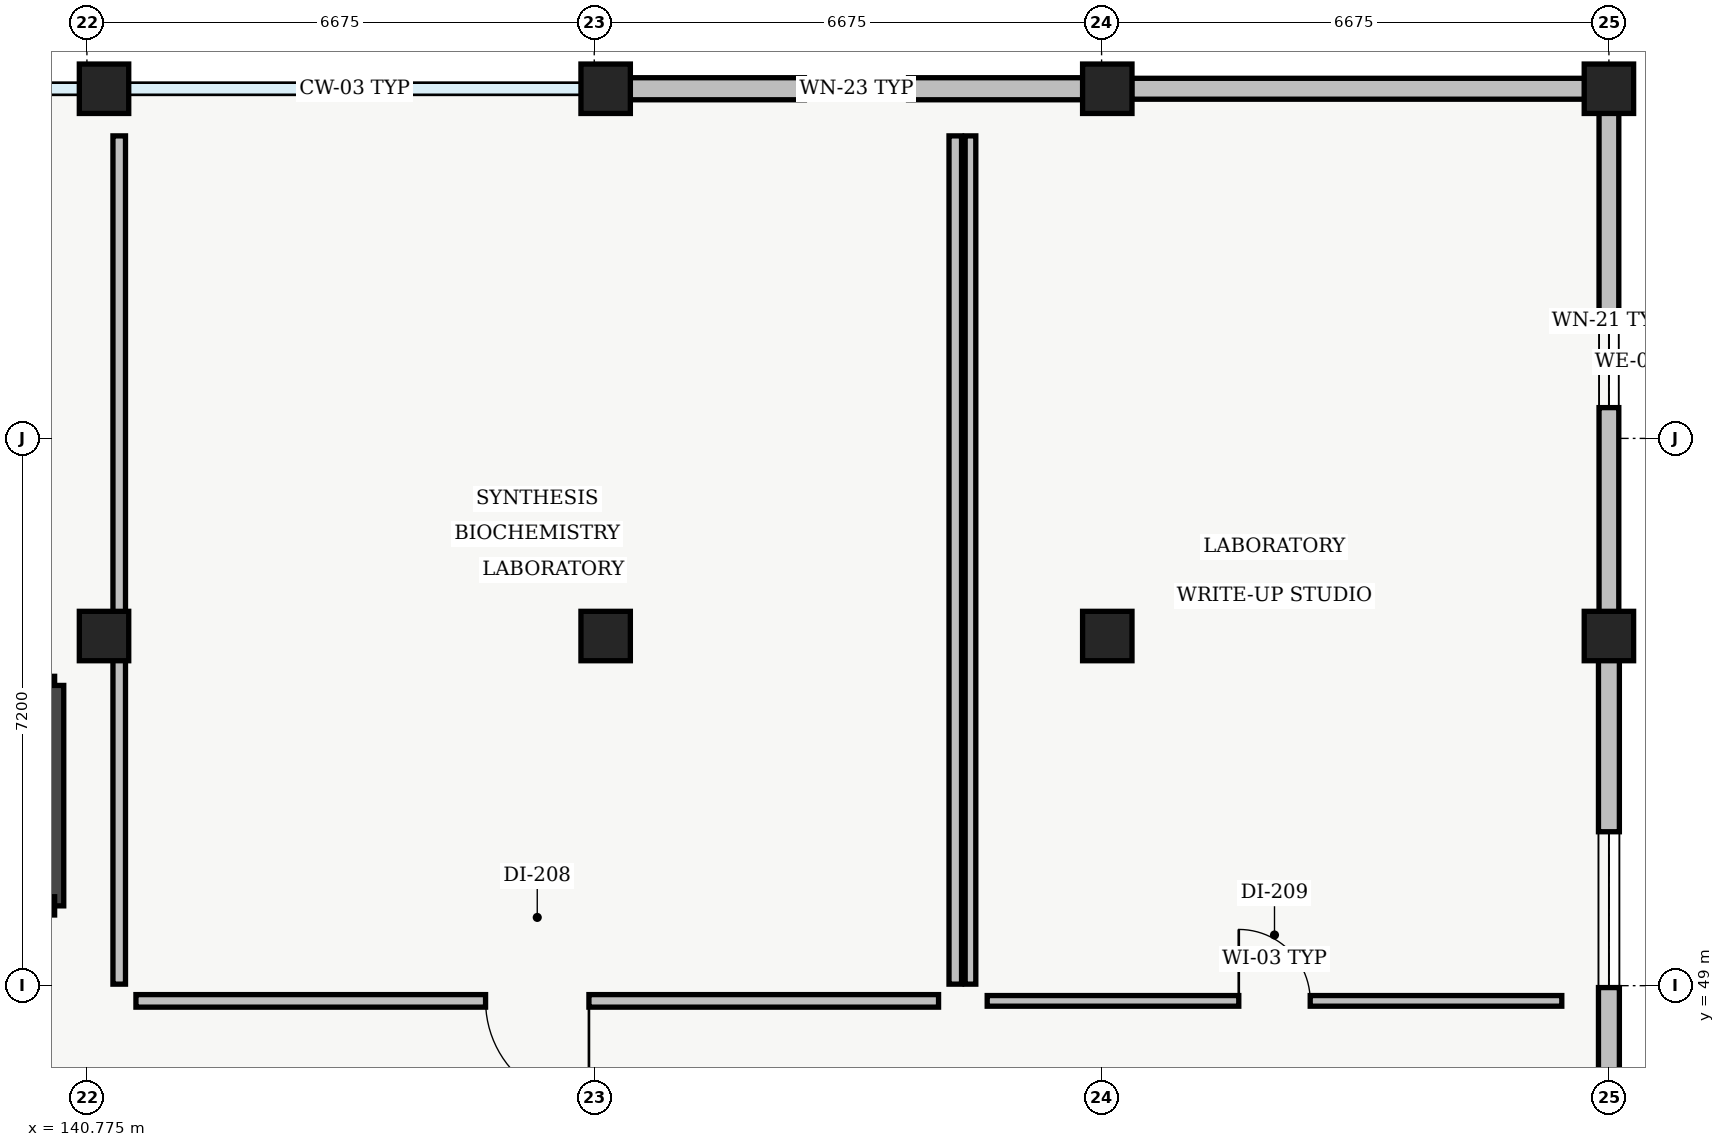
"""IFC4 building model, lengths in metres.
Left out: names, types, materials, properties, quantities, classifications, styles, units other than length and angle.
Written with IfcOpenShell. Run it as: python <this file> out.ifc"""

import sys

from ifc_helpers import new_model, si_unit, direction, frame, frame_2d, origin, origin_2d, place, context, subcontext, project, spatial, rectangle, extrude, element, fill, save


model = new_model("IFC4")
c1 = context("Model", 3, precision=1e-05, world=origin(), true_north=direction((0.0, 1.0)))
c2 = subcontext(c1, "Body", "Model", "MODEL_VIEW")
j1 = project(units=[si_unit("LENGTHUNIT", "METRE"), si_unit("PLANEANGLEUNIT", "RADIAN")], contexts=[c1])
p1 = place(None, origin())
s1 = spatial("IfcSite", under=j1, at=p1, CompositionType="ELEMENT")
p2 = place(p1, origin())
s2 = spatial("IfcBuilding", under=s1, at=p2, CompositionType="ELEMENT")
p3 = place(p2, frame((0.0, 0.0, 9.6)))
s3 = spatial("IfcBuildingStorey", under=s2, at=p3, CompositionType="ELEMENT", Elevation=9.6)
for number, where, z_axis, x_axis in (
    (1, (141.0, 53.6, 0.0), (0.0, 0.0, 1.0), (1.0, 0.0, 0.0)),
    (2, (141.0, 60.8, 0.0), (0.0, 0.0, 1.0), (1.0, 0.0, 0.0)),
    (3, (147.6, 53.6, 0.0), (0.0, 0.0, 1.0), (1.0, 0.0, 0.0)),
    (4, (147.6, 60.8, 0.0), (0.0, 0.0, 1.0), (1.0, 0.0, 0.0)),
    (5, (154.2, 53.6, 0.0), (0.0, 0.0, 1.0), (1.0, 0.0, 0.0)),
    (6, (154.2, 60.8, 0.0), (0.0, 0.0, 1.0), (1.0, 0.0, 0.0)),
    (7, (160.8, 53.6, 0.0), (0.0, 0.0, 1.0), (1.0, 0.0, 0.0)),
    (8, (160.8, 60.8, 0.0), (0.0, 0.0, 1.0), (1.0, 0.0, 0.0)),
):
    element("IfcColumn", number, at=place(p3, frame(where, z_axis=z_axis, x_axis=x_axis)), inside=s3, PredefinedType="COLUMN", context=c2, shape_type="SweptSolid", body=[
        extrude(rectangle(XDim=0.65, YDim=0.65, at=origin_2d()), origin(), (0.0, 0.0, 1.0), 4.3),
    ])
p4 = place(p3, frame((147.92, 60.8, 0.0), z_axis=(0.0, 0.0, 1.0), x_axis=(1.0, 0.0, 0.0)))
e9 = element("IfcWall", 9, at=p4, inside=s3, PredefinedType="STANDARD", context=c2, shape_type="SweptSolid", body=[
    extrude(rectangle(XDim=5.96, YDim=0.29, at=frame_2d((2.98, 0.0))), origin(), (0.0, 0.0, 1.0), 3.835),
])
p5 = place(p4, frame((2.295, 0.0, 0.95)))
e10 = element("IfcOpeningElement", 10, at=p5, cuts=e9, PredefinedType="OPENING", context=c2, shape_type="SweptSolid", body=[
    extrude(rectangle(XDim=1.37, YDim=1.42, at=frame_2d((0.685, 0.71))), frame((0.0, 0.145, 0.0), z_axis=(0.0, -1.0, 0.0), x_axis=(1.0, 0.0, 0.0)), (0.0, 0.0, 1.0), 0.29),
])
p6 = place(p3, frame((154.52, 60.8, 0.0), z_axis=(0.0, 0.0, 1.0), x_axis=(1.0, 0.0, 0.0)))
e11 = element("IfcWall", 11, at=p6, inside=s3, PredefinedType="STANDARD", context=c2, shape_type="SweptSolid", body=[
    extrude(rectangle(XDim=5.96, YDim=0.275, at=frame_2d((2.98, 0.0))), origin(), (0.0, 0.0, 1.0), 3.835),
])
p7 = place(p3, frame((160.8, 60.48, 0.0), z_axis=(0.0, 0.0, 1.0), x_axis=(0.0, -1.0, 0.0)))
e12 = element("IfcWall", 12, at=p7, inside=s3, PredefinedType="STANDARD", context=c2, shape_type="SweptSolid", body=[
    extrude(rectangle(XDim=6.56, YDim=0.26, at=frame_2d((3.28, 0.0))), origin(), (0.0, 0.0, 1.0), 3.835),
])
p8 = place(p7, frame((2.685, 0.0, 0.95)))
e13 = element("IfcOpeningElement", 13, at=p8, cuts=e12, PredefinedType="OPENING", context=c2, shape_type="SweptSolid", body=[
    extrude(rectangle(XDim=1.19, YDim=1.38, at=frame_2d((0.595, 0.69))), frame((0.0, 0.13, 0.0), z_axis=(0.0, -1.0, 0.0), x_axis=(1.0, 0.0, 0.0)), (0.0, 0.0, 1.0), 0.26),
])
p9 = place(p3, frame((160.8, 53.28, 0.0), z_axis=(0.0, 0.0, 1.0), x_axis=(0.0, -1.0, 0.0)))
e14 = element("IfcWall", 14, at=p9, inside=s3, PredefinedType="STANDARD", context=c2, shape_type="SweptSolid", body=[
    extrude(rectangle(XDim=6.56, YDim=0.275, at=frame_2d((3.28, 0.0))), origin(), (0.0, 0.0, 1.0), 3.835),
])
p10 = place(p9, frame((2.255, 0.0, 0.95)))
e15 = element("IfcOpeningElement", 15, at=p10, cuts=e14, PredefinedType="OPENING", context=c2, shape_type="SweptSolid", body=[
    extrude(rectangle(XDim=2.05, YDim=1.7, at=frame_2d((1.025, 0.85))), frame((0.0, 0.137, 0.0), z_axis=(0.0, -1.0, 0.0), x_axis=(1.0, 0.0, 0.0)), (0.0, 0.0, 1.0), 0.275),
])
p11 = place(p3, frame((138.05, 52.95, 0.0), z_axis=(0.0, 0.0, 1.0), x_axis=(1.0, 0.0, 0.0)))
e16 = element("IfcWall", 16, at=p11, inside=s3, PredefinedType="SHEAR", context=c2, shape_type="SweptSolid", body=[
    extrude(rectangle(XDim=2.3, YDim=0.24, at=frame_2d((1.15, 0.0))), origin(), (0.0, 0.0, 1.0), 4.28),
])
p12 = place(p3, frame((140.35, 52.95, 0.0), z_axis=(0.0, 0.0, 1.0), x_axis=(0.0, -1.0, 0.0)))
e17 = element("IfcWall", 17, at=p12, inside=s3, PredefinedType="SHEAR", context=c2, shape_type="SweptSolid", body=[
    extrude(rectangle(XDim=2.9, YDim=0.24, at=frame_2d((1.45, 0.0))), origin(), (0.0, 0.0, 1.0), 4.28),
])
p13 = place(p3, frame((140.35, 50.05, 0.0), z_axis=(0.0, 0.0, 1.0), x_axis=(-1.0, 0.0, 0.0)))
e18 = element("IfcWall", 18, at=p13, inside=s3, PredefinedType="SHEAR", context=c2, shape_type="SweptSolid", body=[
    extrude(rectangle(XDim=2.3, YDim=0.24, at=frame_2d((1.15, 0.0))), origin(), (0.0, 0.0, 1.0), 4.28),
])
p14 = place(p13, frame((0.425, 0.0, 0.0)))
e19 = element("IfcOpeningElement", 19, at=p14, cuts=e18, PredefinedType="OPENING", context=c2, shape_type="SweptSolid", body=[
    extrude(rectangle(XDim=1.45, YDim=2.3, at=frame_2d((0.725, 1.15))), frame((0.0, 0.12, 0.0), z_axis=(0.0, -1.0, 0.0), x_axis=(1.0, 0.0, 0.0)), (0.0, 0.0, 1.0), 0.24),
])
p15 = place(p3, frame((141.42, 48.8, 0.0), z_axis=(0.0, 0.0, 1.0), x_axis=(1.0, 0.0, 0.0)))
e20 = element("IfcWall", 20, at=p15, inside=s3, PredefinedType="PARTITIONING", context=c2, shape_type="SweptSolid", body=[
    extrude(rectangle(XDim=10.56, YDim=0.165, at=frame_2d((5.28, 0.0))), origin(), (0.0, 0.0, 1.0), 3.835),
])
p16 = place(p15, frame((4.6, 0.0, 0.0)))
e21 = element("IfcOpeningElement", 21, at=p16, cuts=e20, PredefinedType="OPENING", context=c2, shape_type="SweptSolid", body=[
    extrude(rectangle(XDim=1.36, YDim=2.14, at=frame_2d((0.68, 1.07))), frame((0.0, 0.083, 0.0), z_axis=(0.0, -1.0, 0.0), x_axis=(1.0, 0.0, 0.0)), (0.0, 0.0, 1.0), 0.165),
])
p17 = place(p3, frame((152.2, 49.02, 0.0), z_axis=(0.0, 0.0, 1.0), x_axis=(0.0, 1.0, 0.0)))
e22 = element("IfcWall", 22, at=p17, inside=s3, PredefinedType="PARTITIONING", context=c2, shape_type="SweptSolid", body=[
    extrude(rectangle(XDim=11.16, YDim=0.165, at=frame_2d((5.58, 0.0))), origin(), (0.0, 0.0, 1.0), 3.95),
])
p18 = place(p3, frame((141.2, 60.18, 0.0), z_axis=(0.0, 0.0, 1.0), x_axis=(0.0, -1.0, 0.0)))
e23 = element("IfcWall", 23, at=p18, inside=s3, PredefinedType="PARTITIONING", context=c2, shape_type="SweptSolid", body=[
    extrude(rectangle(XDim=11.16, YDim=0.165, at=frame_2d((5.58, 0.0))), origin(), (0.0, 0.0, 1.0), 3.635),
])
p19 = place(p3, frame((152.62, 48.8, 0.0), z_axis=(0.0, 0.0, 1.0), x_axis=(1.0, 0.0, 0.0)))
e24 = element("IfcWall", 24, at=p19, inside=s3, PredefinedType="PARTITIONING", context=c2, shape_type="SweptSolid", body=[
    extrude(rectangle(XDim=7.56, YDim=0.14, at=frame_2d((3.78, 0.0))), origin(), (0.0, 0.0, 1.0), 3.835),
])
p20 = place(p19, frame((3.31, 0.0, 0.0)))
e25 = element("IfcOpeningElement", 25, at=p20, cuts=e24, PredefinedType="OPENING", context=c2, shape_type="SweptSolid", body=[
    extrude(rectangle(XDim=0.94, YDim=2.12, at=frame_2d((0.47, 1.06))), frame((0.0, 0.07, 0.0), z_axis=(0.0, -1.0, 0.0), x_axis=(1.0, 0.0, 0.0)), (0.0, 0.0, 1.0), 0.14),
])
p21 = place(p3, frame((152.4, 60.18, 0.0), z_axis=(0.0, 0.0, 1.0), x_axis=(0.0, -1.0, 0.0)))
e26 = element("IfcWall", 26, at=p21, inside=s3, PredefinedType="PARTITIONING", context=c2, shape_type="SweptSolid", body=[
    extrude(rectangle(XDim=11.16, YDim=0.14, at=frame_2d((5.58, 0.0))), origin(), (0.0, 0.0, 1.0), 3.95),
])
p22 = place(p5, origin())
e27 = element("IfcWindow", 27, at=p22, inside=s3, PartitioningType="SINGLE_PANEL", PredefinedType="WINDOW", context=c2, shape_type="SweptSolid", body=[
    extrude(rectangle(XDim=1.37, YDim=1.42, at=frame_2d((0.685, 0.71))), frame((0.0, 0.03, 0.0), z_axis=(0.0, -1.0, 0.0), x_axis=(1.0, 0.0, 0.0)), (0.0, 0.0, 1.0), 0.06),
])
fill(e10, e27)
p23 = place(p8, origin())
e28 = element("IfcWindow", 28, at=p23, inside=s3, PartitioningType="SINGLE_PANEL", PredefinedType="WINDOW", context=c2, shape_type="SweptSolid", body=[
    extrude(rectangle(XDim=1.19, YDim=1.38, at=frame_2d((0.595, 0.69))), frame((0.0, 0.03, 0.0), z_axis=(0.0, -1.0, 0.0), x_axis=(1.0, 0.0, 0.0)), (0.0, 0.0, 1.0), 0.06),
])
fill(e13, e28)
p24 = place(p10, origin())
e29 = element("IfcWindow", 29, at=p24, inside=s3, PartitioningType="SINGLE_PANEL", PredefinedType="WINDOW", context=c2, shape_type="SweptSolid", body=[
    extrude(rectangle(XDim=2.05, YDim=1.7, at=frame_2d((1.025, 0.85))), frame((0.0, 0.03, 0.0), z_axis=(0.0, -1.0, 0.0), x_axis=(1.0, 0.0, 0.0)), (0.0, 0.0, 1.0), 0.06),
])
fill(e15, e29)
p25 = place(p16, origin())
e30 = element("IfcDoor", 30, at=p25, inside=s3, OperationType="SINGLE_SWING_RIGHT", PredefinedType="DOOR", context=c2, shape_type="SweptSolid", body=[
    extrude(rectangle(XDim=1.36, YDim=2.14, at=frame_2d((0.68, 1.07))), frame((0.0, 0.025, 0.0), z_axis=(0.0, -1.0, 0.0), x_axis=(1.0, 0.0, 0.0)), (0.0, 0.0, 1.0), 0.05),
])
fill(e21, e30)
p26 = place(p20, origin())
e31 = element("IfcDoor", 31, at=p26, inside=s3, OperationType="SINGLE_SWING_LEFT", PredefinedType="DOOR", context=c2, shape_type="SweptSolid", body=[
    extrude(rectangle(XDim=0.94, YDim=2.12, at=frame_2d((0.47, 1.06))), frame((0.0, 0.025, 0.0), z_axis=(0.0, -1.0, 0.0), x_axis=(1.0, 0.0, 0.0)), (0.0, 0.0, 1.0), 0.05),
])
fill(e25, e31)
save(model, sys.argv[1])
